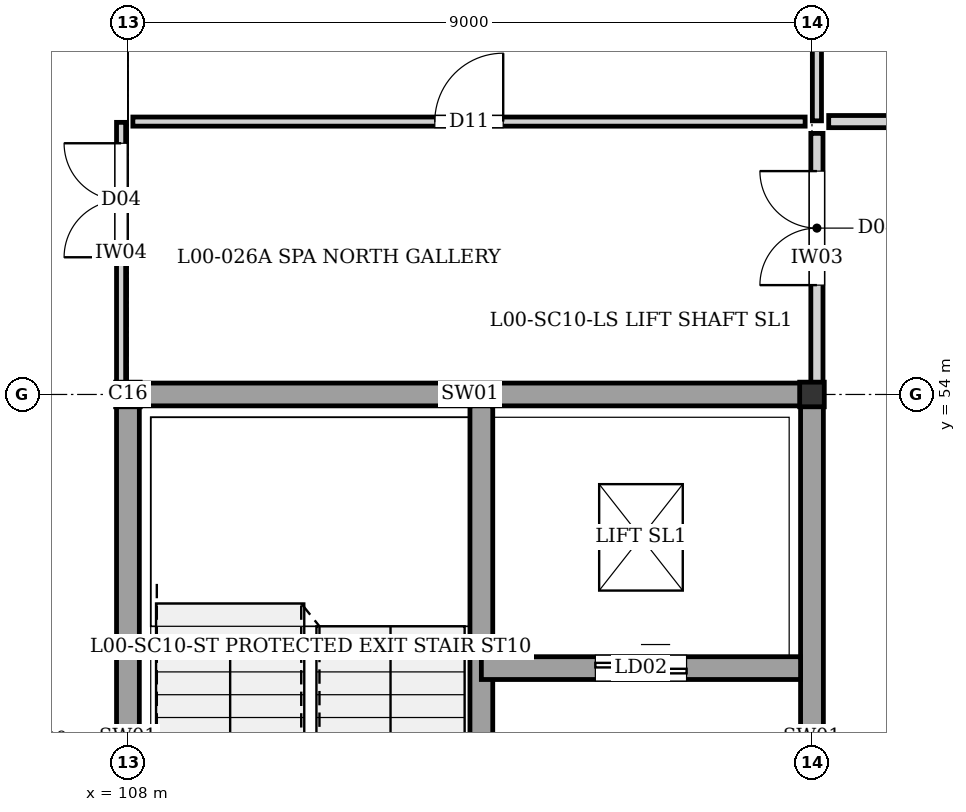
"""IFC4 building model, lengths in metres.
Left out: names, types, materials, properties, quantities, classifications, styles, units other than length and angle.
Written with IfcOpenShell. Run it as: python <this file> out.ifc"""

import sys

from ifc_helpers import new_model, si_unit, direction, frame, frame_2d, origin, origin_2d, place, context, subcontext, project, spatial, rectangle, hollow_circle, extrude, element, fill, save


model = new_model("IFC4")
c1 = context("Model", 3, precision=1e-05, world=origin(), true_north=direction((0.0, 1.0)))
c2 = subcontext(c1, "Body", "Model", "MODEL_VIEW")
j1 = project(units=[si_unit("LENGTHUNIT", "METRE"), si_unit("PLANEANGLEUNIT", "RADIAN")], contexts=[c1])
p1 = place(None, origin())
s1 = spatial("IfcSite", under=j1, at=p1, CompositionType="ELEMENT")
p2 = place(p1, origin())
s2 = spatial("IfcBuilding", under=s1, at=p2, CompositionType="ELEMENT")
p3 = place(p2, origin())
s3 = spatial("IfcBuildingStorey", under=s2, at=p3, CompositionType="ELEMENT", Elevation=0.0)
for number, where, z_axis, x_axis in (
    (1, (108.0, 54.0, 0.0), (0.0, 0.0, 1.0), (1.0, 0.0, 0.0)),
    (2, (117.0, 54.0, 0.0), (0.0, 0.0, 1.0), (1.0, 0.0, 0.0)),
):
    element("IfcColumn", number, at=place(p3, frame(where, z_axis=z_axis, x_axis=x_axis)), inside=s3, PredefinedType="COLUMN", context=c2, shape_type="SweptSolid", body=[
        extrude(hollow_circle(Radius=0.162, WallThickness=0.016, at=origin_2d()), origin(), (0.0, 0.0, 1.0), 4.32),
    ])
p4 = place(p3, frame((117.0, 45.0, 0.0), z_axis=(0.0, 0.0, 1.0), x_axis=(0.0, 1.0, 0.0)))
e3 = element("IfcWall", 3, at=p4, inside=s3, PredefinedType="SHEAR", context=c2, shape_type="SweptSolid", body=[
    extrude(rectangle(XDim=9.0, YDim=0.3, at=frame_2d((4.5, 0.0))), origin(), (0.0, 0.0, 1.0), 4.055),
])
p5 = place(p4, frame((2.05, 0.0, 0.0)))
e4 = element("IfcOpeningElement", 4, at=p5, cuts=e3, PredefinedType="OPENING", context=c2, shape_type="SweptSolid", body=[
    extrude(rectangle(XDim=1.4, YDim=2.02, at=frame_2d((0.7, 1.01))), frame((0.0, 0.16, 0.0), z_axis=(0.0, -1.0, 0.0), x_axis=(1.0, 0.0, 0.0)), (0.0, 0.0, 1.0), 0.32),
])
for number, where, z_axis, x_axis in (
    (5, (108.0, 54.0, 0.0), (0.0, 0.0, 1.0), (1.0, 0.0, 0.0)),
    (6, (108.0, 45.0, 0.0), (0.0, 0.0, 1.0), (0.0, 1.0, 0.0)),
):
    element("IfcWall", number, at=place(p3, frame(where, z_axis=z_axis, x_axis=x_axis)), inside=s3, PredefinedType="SHEAR", context=c2, shape_type="SweptSolid", body=[
        extrude(rectangle(XDim=9.0, YDim=0.3, at=frame_2d((4.5, 0.0))), origin(), (0.0, 0.0, 1.0), 4.055),
    ])
p6 = place(p3, frame((112.65, 45.15, 0.0), z_axis=(0.0, 0.0, 1.0), x_axis=(0.0, 1.0, 0.0)))
e7 = element("IfcWall", 7, at=p6, inside=s3, PredefinedType="SHEAR", context=c2, shape_type="SweptSolid", body=[
    extrude(rectangle(XDim=8.7, YDim=0.3, at=frame_2d((4.35, 0.0))), origin(), (0.0, 0.0, 1.0), 4.055),
])
p7 = place(p6, frame((0.35, 0.0, 0.0)))
e8 = element("IfcOpeningElement", 8, at=p7, cuts=e7, PredefinedType="OPENING", context=c2, shape_type="SweptSolid", body=[
    extrude(rectangle(XDim=1.4, YDim=2.02, at=frame_2d((0.7, 1.01))), frame((0.0, 0.16, 0.0), z_axis=(0.0, -1.0, 0.0), x_axis=(1.0, 0.0, 0.0)), (0.0, 0.0, 1.0), 0.32),
])
p8 = place(p3, frame((112.65, 50.4, 0.0), z_axis=(0.0, 0.0, 1.0), x_axis=(1.0, 0.0, 0.0)))
e9 = element("IfcWall", 9, at=p8, inside=s3, PredefinedType="SHEAR", context=c2, shape_type="SweptSolid", body=[
    extrude(rectangle(XDim=4.2, YDim=0.3, at=frame_2d((2.1, 0.0))), origin(), (0.0, 0.0, 1.0), 4.055),
])
p9 = place(p8, frame((1.5, 0.0, 0.0)))
e10 = element("IfcOpeningElement", 10, at=p9, cuts=e9, PredefinedType="OPENING", context=c2, shape_type="SweptSolid", body=[
    extrude(rectangle(XDim=1.2, YDim=2.2, at=frame_2d((0.6, 1.1))), frame((0.0, 0.16, 0.0), z_axis=(0.0, -1.0, 0.0), x_axis=(1.0, 0.0, 0.0)), (0.0, 0.0, 1.0), 0.32),
])
p10 = place(p3, frame((117.065, 57.6, 0.0), z_axis=(0.0, 0.0, 1.0), x_axis=(0.0, 1.0, 0.0)))
e11 = element("IfcWall", 11, at=p10, inside=s3, PredefinedType="PARTITIONING", context=c2, shape_type="SweptSolid", body=[
    extrude(rectangle(XDim=5.265, YDim=0.12, at=frame_2d((2.632, 0.0))), origin(), (0.0, 0.0, 1.0), 3.765),
])
p11 = place(p3, frame((107.91, 54.155, 0.0), z_axis=(0.0, 0.0, 1.0), x_axis=(0.0, 1.0, 0.0)))
e12 = element("IfcWall", 12, at=p11, inside=s3, PredefinedType="PARTITIONING", context=c2, shape_type="SweptSolid", body=[
    extrude(rectangle(XDim=3.425, YDim=0.12, at=frame_2d((1.712, 0.0))), origin(), (0.0, 0.0, 1.0), 3.755),
])
p12 = place(p11, frame((1.65, 0.0, 0.0)))
e13 = element("IfcOpeningElement", 13, at=p12, cuts=e12, PredefinedType="OPENING", context=c2, shape_type="SweptSolid", body=[
    extrude(rectangle(XDim=1.5, YDim=2.1, at=frame_2d((0.75, 1.05))), frame((0.0, 0.07, 0.0), z_axis=(0.0, -1.0, 0.0), x_axis=(1.0, 0.0, 0.0)), (0.0, 0.0, 1.0), 0.14),
])
p13 = place(p3, frame((117.22, 57.59, 0.0), z_axis=(0.0, 0.0, 1.0), x_axis=(1.0, 0.0, 0.0)))
e14 = element("IfcWall", 14, at=p13, inside=s3, PredefinedType="PARTITIONING", context=c2, shape_type="SweptSolid", body=[
    extrude(rectangle(XDim=8.535, YDim=0.16, at=frame_2d((4.268, 0.0))), origin(), (0.0, 0.0, 1.0), 4.055),
])
p14 = place(p13, frame((3.817, 0.0, 0.0)))
e15 = element("IfcOpeningElement", 15, at=p14, cuts=e14, PredefinedType="OPENING", context=c2, shape_type="SweptSolid", body=[
    extrude(rectangle(XDim=0.9, YDim=2.2, at=frame_2d((0.45, 1.1))), frame((0.0, 0.09, 0.0), z_axis=(0.0, -1.0, 0.0), x_axis=(1.0, 0.0, 0.0)), (0.0, 0.0, 1.0), 0.18),
])
p15 = place(p3, frame((117.065, 54.155, 0.0), z_axis=(0.0, 0.0, 1.0), x_axis=(0.0, 1.0, 0.0)))
e16 = element("IfcWall", 16, at=p15, inside=s3, PredefinedType="PARTITIONING", context=c2, shape_type="SweptSolid", body=[
    extrude(rectangle(XDim=3.28, YDim=0.16, at=frame_2d((1.64, 0.0))), origin(), (0.0, 0.0, 1.0), 3.765),
])
p16 = place(p15, frame((1.284, 0.0, 0.0)))
e17 = element("IfcOpeningElement", 17, at=p16, cuts=e16, PredefinedType="OPENING", context=c2, shape_type="SweptSolid", body=[
    extrude(rectangle(XDim=1.5, YDim=2.1, at=frame_2d((0.75, 1.05))), frame((0.0, 0.09, 0.0), z_axis=(0.0, -1.0, 0.0), x_axis=(1.0, 0.0, 0.0)), (0.0, 0.0, 1.0), 0.18),
])
p17 = place(p3, frame((108.065, 57.59, 0.0), z_axis=(0.0, 0.0, 1.0), x_axis=(1.0, 0.0, 0.0)))
e18 = element("IfcWall", 18, at=p17, inside=s3, PredefinedType="PARTITIONING", context=c2, shape_type="SweptSolid", body=[
    extrude(rectangle(XDim=8.845, YDim=0.12, at=frame_2d((4.422, 0.0))), origin(), (0.0, 0.0, 1.0), 4.055),
])
p18 = place(p17, frame((3.972, 0.0, 0.0)))
e19 = element("IfcOpeningElement", 19, at=p18, cuts=e18, PredefinedType="OPENING", context=c2, shape_type="SweptSolid", body=[
    extrude(rectangle(XDim=0.9, YDim=2.2, at=frame_2d((0.45, 1.1))), frame((0.0, 0.07, 0.0), z_axis=(0.0, -1.0, 0.0), x_axis=(1.0, 0.0, 0.0)), (0.0, 0.0, 1.0), 0.14),
])
p19 = place(p9, origin())
e20 = element("IfcDoor", 20, at=p19, inside=s3, OperationType="DOUBLE_DOOR_SLIDING", PredefinedType="DOOR", context=c2, shape_type="SweptSolid", body=[
    extrude(rectangle(XDim=1.2, YDim=2.2, at=frame_2d((0.6, 1.1))), frame((0.0, 0.025, 0.0), z_axis=(0.0, -1.0, 0.0), x_axis=(1.0, 0.0, 0.0)), (0.0, 0.0, 1.0), 0.05),
])
fill(e10, e20)
p20 = place(p12, origin())
e21 = element("IfcDoor", 21, at=p20, inside=s3, OperationType="DOUBLE_DOOR_SINGLE_SWING", PredefinedType="DOOR", context=c2, shape_type="SweptSolid", body=[
    extrude(rectangle(XDim=1.5, YDim=2.1, at=frame_2d((0.75, 1.05))), frame((0.0, 0.025, 0.0), z_axis=(0.0, -1.0, 0.0), x_axis=(1.0, 0.0, 0.0)), (0.0, 0.0, 1.0), 0.05),
])
fill(e13, e21)
p21 = place(p16, origin())
e22 = element("IfcDoor", 22, at=p21, inside=s3, OperationType="DOUBLE_DOOR_SINGLE_SWING", PredefinedType="DOOR", context=c2, shape_type="SweptSolid", body=[
    extrude(rectangle(XDim=1.5, YDim=2.1, at=frame_2d((0.75, 1.05))), frame((0.0, 0.025, 0.0), z_axis=(0.0, -1.0, 0.0), x_axis=(1.0, 0.0, 0.0)), (0.0, 0.0, 1.0), 0.05),
])
fill(e17, e22)
p22 = place(p18, origin())
e23 = element("IfcDoor", 23, at=p22, inside=s3, OperationType="SINGLE_SWING_RIGHT", PredefinedType="DOOR", context=c2, shape_type="SweptSolid", body=[
    extrude(rectangle(XDim=0.9, YDim=2.2, at=frame_2d((0.45, 1.1))), frame((0.0, 0.025, 0.0), z_axis=(0.0, -1.0, 0.0), x_axis=(1.0, 0.0, 0.0)), (0.0, 0.0, 1.0), 0.05),
])
fill(e19, e23)
save(model, sys.argv[1])
